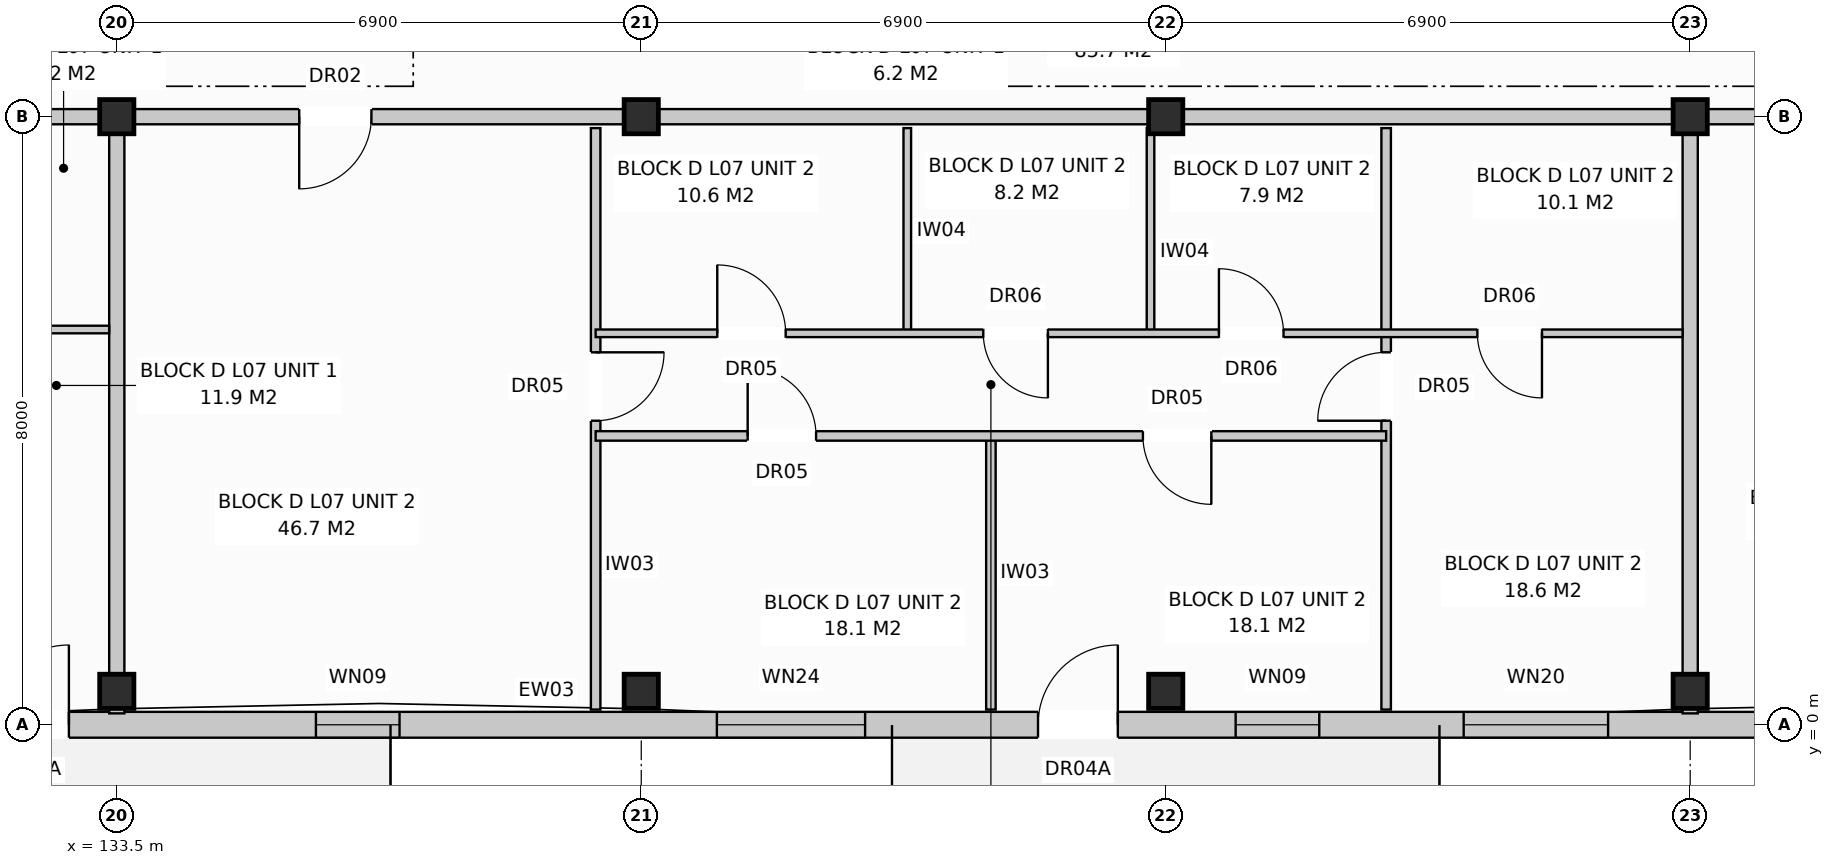
"""IFC4 building model, lengths in metres.
Left out: names, types, materials, properties, quantities, classifications, styles, units other than length and angle.
Written with IfcOpenShell. Run it as: python <this file> out.ifc"""

import sys

from ifc_helpers import new_model, si_unit, direction, frame, frame_2d, origin, origin_with_axes, origin_2d, place, context, subcontext, project, spatial, rectangle, extrude, element, fill, save


model = new_model("IFC4")
c1 = context("Model", 3, precision=1e-05, world=origin(), true_north=direction((0.0, 1.0)))
c2 = subcontext(c1, "Body", "Model", "MODEL_VIEW")
j1 = project(units=[si_unit("LENGTHUNIT", "METRE"), si_unit("PLANEANGLEUNIT", "RADIAN")], contexts=[c1])
p1 = place(None, origin())
s1 = spatial("IfcSite", under=j1, at=p1, CompositionType="ELEMENT")
p2 = place(p1, origin())
s2 = spatial("IfcBuilding", under=s1, at=p2, CompositionType="ELEMENT")
p3 = place(p2, frame((0.0, 0.0, 24.0)))
s3 = spatial("IfcBuildingStorey", under=s2, at=p3, CompositionType="ELEMENT", Elevation=24.0)
for number, where, z_axis, x_axis in (
    (1, (133.5, 0.44, 0.0), (0.0, 0.0, 1.0), (1.0, 0.0, 0.0)),
    (2, (133.5, 8.0, 0.0), (0.0, 0.0, 1.0), (1.0, 0.0, 0.0)),
    (3, (140.4, 0.44, 0.0), (0.0, 0.0, 1.0), (1.0, 0.0, 0.0)),
    (4, (140.4, 8.0, 0.0), (0.0, 0.0, 1.0), (1.0, 0.0, 0.0)),
    (5, (147.3, 0.44, 0.0), (0.0, 0.0, 1.0), (1.0, 0.0, 0.0)),
    (6, (147.3, 8.0, 0.0), (0.0, 0.0, 1.0), (1.0, 0.0, 0.0)),
    (7, (154.2, 0.44, 0.0), (0.0, 0.0, 1.0), (1.0, 0.0, 0.0)),
    (8, (154.2, 8.0, 0.0), (0.0, 0.0, 1.0), (1.0, 0.0, 0.0)),
):
    element("IfcColumn", number, at=place(p3, frame(where, z_axis=z_axis, x_axis=x_axis)), inside=s3, PredefinedType="COLUMN", context=c2, shape_type="SweptSolid", body=[
        extrude(rectangle(XDim=0.45, YDim=0.45, at=origin_2d()), origin(), (0.0, 0.0, 1.0), 3.2),
    ])
p4 = place(p3, frame((126.76, 0.0, 0.0), z_axis=(0.0, 0.0, 1.0), x_axis=(1.0, 0.0, 0.0)))
e9 = element("IfcWall", 9, at=p4, inside=s3, PredefinedType="STANDARD", context=c2, shape_type="SweptSolid", body=[
    extrude(rectangle(XDim=41.08, YDim=0.34, at=frame_2d((20.54, 0.0))), origin(), (0.0, 0.0, 1.0), 2.95),
])
p5 = place(p4, frame((5.06, 0.0, 0.0)))
e10 = element("IfcOpeningElement", 10, at=p5, cuts=e9, PredefinedType="OPENING", context=c2, shape_type="SweptSolid", body=[
    extrude(rectangle(XDim=1.05, YDim=2.12, at=frame_2d((0.525, 1.06))), frame((0.0, 0.182, 0.0), z_axis=(0.0, -1.0, 0.0), x_axis=(1.0, 0.0, 0.0)), (0.0, 0.0, 1.0), 0.364),
])
p6 = place(p4, frame((18.86, 0.0, 0.0)))
e11 = element("IfcOpeningElement", 11, at=p6, cuts=e9, PredefinedType="OPENING", context=c2, shape_type="SweptSolid", body=[
    extrude(rectangle(XDim=1.05, YDim=2.12, at=frame_2d((0.525, 1.06))), frame((0.0, 0.182, 0.0), z_axis=(0.0, -1.0, 0.0), x_axis=(1.0, 0.0, 0.0)), (0.0, 0.0, 1.0), 0.364),
])
p7 = place(p4, frame((31.359, 0.0, 0.0)))
e12 = element("IfcOpeningElement", 12, at=p7, cuts=e9, PredefinedType="OPENING", context=c2, shape_type="SweptSolid", body=[
    extrude(rectangle(XDim=1.05, YDim=2.12, at=frame_2d((0.525, 1.06))), frame((0.0, 0.182, 0.0), z_axis=(0.0, -1.0, 0.0), x_axis=(1.0, 0.0, 0.0)), (0.0, 0.0, 1.0), 0.364),
])
p8 = place(p4, frame((1.11, 0.0, 0.8)))
e13 = element("IfcOpeningElement", 13, at=p8, cuts=e9, PredefinedType="OPENING", context=c2, shape_type="SweptSolid", body=[
    extrude(rectangle(XDim=1.8, YDim=1.7, at=frame_2d((0.9, 0.85))), frame((0.0, 0.182, 0.0), z_axis=(0.0, -1.0, 0.0), x_axis=(1.0, 0.0, 0.0)), (0.0, 0.0, 1.0), 0.364),
])
p9 = place(p4, frame((9.36, 0.0, 0.72)))
e14 = element("IfcOpeningElement", 14, at=p9, cuts=e9, PredefinedType="OPENING", context=c2, shape_type="SweptSolid", body=[
    extrude(rectangle(XDim=1.1, YDim=1.5, at=frame_2d((0.55, 0.75))), frame((0.0, 0.182, 0.0), z_axis=(0.0, -1.0, 0.0), x_axis=(1.0, 0.0, 0.0)), (0.0, 0.0, 1.0), 0.364),
])
p10 = place(p4, frame((14.635, 0.0, 0.8)))
e15 = element("IfcOpeningElement", 15, at=p10, cuts=e9, PredefinedType="OPENING", context=c2, shape_type="SweptSolid", body=[
    extrude(rectangle(XDim=1.95, YDim=1.65, at=frame_2d((0.975, 0.825))), frame((0.0, 0.182, 0.0), z_axis=(0.0, -1.0, 0.0), x_axis=(1.0, 0.0, 0.0)), (0.0, 0.0, 1.0), 0.364),
])
p11 = place(p4, frame((21.46, 0.0, 0.72)))
e16 = element("IfcOpeningElement", 16, at=p11, cuts=e9, PredefinedType="OPENING", context=c2, shape_type="SweptSolid", body=[
    extrude(rectangle(XDim=1.1, YDim=1.5, at=frame_2d((0.55, 0.75))), frame((0.0, 0.182, 0.0), z_axis=(0.0, -1.0, 0.0), x_axis=(1.0, 0.0, 0.0)), (0.0, 0.0, 1.0), 0.364),
])
p12 = place(p4, frame((24.46, 0.0, 0.8)))
e17 = element("IfcOpeningElement", 17, at=p12, cuts=e9, PredefinedType="OPENING", context=c2, shape_type="SweptSolid", body=[
    extrude(rectangle(XDim=1.9, YDim=1.85, at=frame_2d((0.95, 0.925))), frame((0.0, 0.182, 0.0), z_axis=(0.0, -1.0, 0.0), x_axis=(1.0, 0.0, 0.0)), (0.0, 0.0, 1.0), 0.364),
])
p13 = place(p4, frame((29.135, 0.0, 0.8)))
e18 = element("IfcOpeningElement", 18, at=p13, cuts=e9, PredefinedType="OPENING", context=c2, shape_type="SweptSolid", body=[
    extrude(rectangle(XDim=1.95, YDim=1.65, at=frame_2d((0.975, 0.825))), frame((0.0, 0.182, 0.0), z_axis=(0.0, -1.0, 0.0), x_axis=(1.0, 0.0, 0.0)), (0.0, 0.0, 1.0), 0.364),
])
p14 = place(p4, frame((35.26, 0.0, 0.72)))
e19 = element("IfcOpeningElement", 19, at=p14, cuts=e9, PredefinedType="OPENING", context=c2, shape_type="SweptSolid", body=[
    extrude(rectangle(XDim=1.1, YDim=1.5, at=frame_2d((0.55, 0.75))), frame((0.0, 0.182, 0.0), z_axis=(0.0, -1.0, 0.0), x_axis=(1.0, 0.0, 0.0)), (0.0, 0.0, 1.0), 0.364),
])
p15 = place(p4, frame((38.06, 0.0, 0.8)))
e20 = element("IfcOpeningElement", 20, at=p15, cuts=e9, PredefinedType="OPENING", context=c2, shape_type="SweptSolid", body=[
    extrude(rectangle(XDim=1.9, YDim=1.85, at=frame_2d((0.95, 0.925))), frame((0.0, 0.182, 0.0), z_axis=(0.0, -1.0, 0.0), x_axis=(1.0, 0.0, 0.0)), (0.0, 0.0, 1.0), 0.364),
])
p16 = place(p3, frame((133.5, 7.85, 0.0), z_axis=(0.0, 0.0, 1.0), x_axis=(0.0, -1.0, 0.0)))
e21 = element("IfcWall", 21, at=p16, inside=s3, PredefinedType="PARTITIONING", context=c2, shape_type="SweptSolid", body=[
    extrude(rectangle(XDim=7.7, YDim=0.2, at=frame_2d((3.85, 0.0))), origin(), (0.0, 0.0, 1.0), 2.39),
])
p17 = place(p3, frame((126.6, 8.0, 0.0), z_axis=(0.0, 0.0, 1.0), x_axis=(1.0, 0.0, 0.0)))
e22 = element("IfcWall", 22, at=p17, inside=s3, PredefinedType="PARTITIONING", context=c2, shape_type="SweptSolid", body=[
    extrude(rectangle(XDim=6.9, YDim=0.2, at=frame_2d((3.45, 0.0))), origin(), (0.0, 0.0, 1.0), 2.39),
])
p18 = place(p17, frame((2.0, 0.0, 0.0)))
e23 = element("IfcOpeningElement", 23, at=p18, cuts=e22, PredefinedType="OPENING", context=c2, shape_type="SweptSolid", body=[
    extrude(rectangle(XDim=0.95, YDim=2.15, at=frame_2d((0.475, 1.075))), frame((0.0, 0.112, 0.0), z_axis=(0.0, -1.0, 0.0), x_axis=(1.0, 0.0, 0.0)), (0.0, 0.0, 1.0), 0.224),
])
p19 = place(p3, frame((130.9, 5.2, 0.0), z_axis=(0.0, 0.0, 1.0), x_axis=(1.0, 0.0, 0.0)))
e24 = element("IfcWall", 24, at=p19, inside=s3, PredefinedType="PARTITIONING", context=c2, shape_type="SweptSolid", body=[
    extrude(rectangle(XDim=2.5, YDim=0.1, at=frame_2d((1.25, 0.0))), origin(), (0.0, 0.0, 1.0), 2.95),
])
p20 = place(p3, frame((154.2, 7.85, 0.0), z_axis=(0.0, 0.0, 1.0), x_axis=(0.0, -1.0, 0.0)))
e25 = element("IfcWall", 25, at=p20, inside=s3, PredefinedType="PARTITIONING", context=c2, shape_type="SweptSolid", body=[
    extrude(rectangle(XDim=7.7, YDim=0.2, at=frame_2d((3.85, 0.0))), origin(), (0.0, 0.0, 1.0), 2.95),
])
p21 = place(p3, frame((133.5, 8.0, 0.0), z_axis=(0.0, 0.0, 1.0), x_axis=(1.0, 0.0, 0.0)))
e26 = element("IfcWall", 26, at=p21, inside=s3, PredefinedType="PARTITIONING", context=c2, shape_type="SweptSolid", body=[
    extrude(rectangle(XDim=20.7, YDim=0.2, at=frame_2d((10.35, 0.0))), origin(), (0.0, 0.0, 1.0), 2.39),
])
p22 = place(p21, frame((2.4, 0.0, 0.0)))
e27 = element("IfcOpeningElement", 27, at=p22, cuts=e26, PredefinedType="OPENING", context=c2, shape_type="SweptSolid", body=[
    extrude(rectangle(XDim=0.95, YDim=2.15, at=frame_2d((0.475, 1.075))), frame((0.0, 0.112, 0.0), z_axis=(0.0, -1.0, 0.0), x_axis=(1.0, 0.0, 0.0)), (0.0, 0.0, 1.0), 0.224),
])
p23 = place(p3, frame((139.8, 7.85, 0.0), z_axis=(0.0, 0.0, 1.0), x_axis=(0.0, -1.0, 0.0)))
e28 = element("IfcWall", 28, at=p23, inside=s3, PredefinedType="PARTITIONING", context=c2, shape_type="SweptSolid", body=[
    extrude(rectangle(XDim=7.65, YDim=0.125, at=frame_2d((3.825, 0.0))), origin(), (0.0, 0.0, 1.0), 2.95),
])
p24 = place(p23, frame((2.95, 0.0, 0.0)))
e29 = element("IfcOpeningElement", 29, at=p24, cuts=e28, PredefinedType="OPENING", context=c2, shape_type="SweptSolid", body=[
    extrude(rectangle(XDim=0.9, YDim=2.1, at=frame_2d((0.45, 1.05))), frame((0.0, 0.074, 0.0), z_axis=(0.0, -1.0, 0.0), x_axis=(1.0, 0.0, 0.0)), (0.0, 0.0, 1.0), 0.149),
])
for number, where, z_axis, x_axis in (
    (30, (143.9, 7.85, 0.0), (0.0, 0.0, 1.0), (0.0, -1.0, 0.0)),
    (31, (147.1, 7.85, 0.0), (0.0, 0.0, 1.0), (0.0, -1.0, 0.0)),
):
    element("IfcWall", number, at=place(p3, frame(where, z_axis=z_axis, x_axis=x_axis)), inside=s3, PredefinedType="PARTITIONING", context=c2, shape_type="SweptSolid", body=[
        extrude(rectangle(XDim=2.7, YDim=0.1, at=frame_2d((1.35, 0.0))), origin(), (0.0, 0.0, 1.0), 2.95),
    ])
p25 = place(p3, frame((145.0, 3.8, 0.0), z_axis=(0.0, 0.0, 1.0), x_axis=(0.0, -1.0, 0.0)))
e32 = element("IfcWall", 32, at=p25, inside=s3, PredefinedType="PARTITIONING", context=c2, shape_type="SweptSolid", body=[
    extrude(rectangle(XDim=3.6, YDim=0.125, at=frame_2d((1.8, 0.0))), origin(), (0.0, 0.0, 1.0), 2.59),
])
p26 = place(p3, frame((150.2, 7.85, 0.0), z_axis=(0.0, 0.0, 1.0), x_axis=(0.0, -1.0, 0.0)))
e33 = element("IfcWall", 33, at=p26, inside=s3, PredefinedType="PARTITIONING", context=c2, shape_type="SweptSolid", body=[
    extrude(rectangle(XDim=7.65, YDim=0.125, at=frame_2d((3.825, 0.0))), origin(), (0.0, 0.0, 1.0), 2.95),
])
p27 = place(p26, frame((2.95, 0.0, 0.0)))
e34 = element("IfcOpeningElement", 34, at=p27, cuts=e33, PredefinedType="OPENING", context=c2, shape_type="SweptSolid", body=[
    extrude(rectangle(XDim=0.9, YDim=2.1, at=frame_2d((0.45, 1.05))), frame((0.0, 0.074, 0.0), z_axis=(0.0, -1.0, 0.0), x_axis=(1.0, 0.0, 0.0)), (0.0, 0.0, 1.0), 0.149),
])
p28 = place(p3, frame((139.8, 5.15, 0.0), z_axis=(0.0, 0.0, 1.0), x_axis=(1.0, 0.0, 0.0)))
e35 = element("IfcWall", 35, at=p28, inside=s3, PredefinedType="PARTITIONING", context=c2, shape_type="SweptSolid", body=[
    extrude(rectangle(XDim=14.3, YDim=0.1, at=frame_2d((7.15, 0.0))), origin(), (0.0, 0.0, 1.0), 2.95),
])
p29 = place(p28, frame((1.6, 0.0, 0.0)))
e36 = element("IfcOpeningElement", 36, at=p29, cuts=e35, PredefinedType="OPENING", context=c2, shape_type="SweptSolid", body=[
    extrude(rectangle(XDim=0.9, YDim=2.1, at=frame_2d((0.45, 1.05))), frame((0.0, 0.062, 0.0), z_axis=(0.0, -1.0, 0.0), x_axis=(1.0, 0.0, 0.0)), (0.0, 0.0, 1.0), 0.124),
])
p30 = place(p28, frame((5.1, 0.0, 0.0)))
e37 = element("IfcOpeningElement", 37, at=p30, cuts=e35, PredefinedType="OPENING", context=c2, shape_type="SweptSolid", body=[
    extrude(rectangle(XDim=0.85, YDim=2.05, at=frame_2d((0.425, 1.025))), frame((0.0, 0.062, 0.0), z_axis=(0.0, -1.0, 0.0), x_axis=(1.0, 0.0, 0.0)), (0.0, 0.0, 1.0), 0.124),
])
p31 = place(p28, frame((8.2, 0.0, 0.0)))
e38 = element("IfcOpeningElement", 38, at=p31, cuts=e35, PredefinedType="OPENING", context=c2, shape_type="SweptSolid", body=[
    extrude(rectangle(XDim=0.85, YDim=2.05, at=frame_2d((0.425, 1.025))), frame((0.0, 0.062, 0.0), z_axis=(0.0, -1.0, 0.0), x_axis=(1.0, 0.0, 0.0)), (0.0, 0.0, 1.0), 0.124),
])
p32 = place(p28, frame((11.6, 0.0, 0.0)))
e39 = element("IfcOpeningElement", 39, at=p32, cuts=e35, PredefinedType="OPENING", context=c2, shape_type="SweptSolid", body=[
    extrude(rectangle(XDim=0.85, YDim=2.05, at=frame_2d((0.425, 1.025))), frame((0.0, 0.062, 0.0), z_axis=(0.0, -1.0, 0.0), x_axis=(1.0, 0.0, 0.0)), (0.0, 0.0, 1.0), 0.124),
])
p33 = place(p3, frame((139.8, 3.8, 0.0), z_axis=(0.0, 0.0, 1.0), x_axis=(1.0, 0.0, 0.0)))
e40 = element("IfcWall", 40, at=p33, inside=s3, PredefinedType="PARTITIONING", context=c2, shape_type="SweptSolid", body=[
    extrude(rectangle(XDim=10.4, YDim=0.125, at=frame_2d((5.2, 0.0))), origin(), (0.0, 0.0, 1.0), 2.95),
])
p34 = place(p33, frame((2.0, 0.0, 0.0)))
e41 = element("IfcOpeningElement", 41, at=p34, cuts=e40, PredefinedType="OPENING", context=c2, shape_type="SweptSolid", body=[
    extrude(rectangle(XDim=0.9, YDim=2.1, at=frame_2d((0.45, 1.05))), frame((0.0, 0.074, 0.0), z_axis=(0.0, -1.0, 0.0), x_axis=(1.0, 0.0, 0.0)), (0.0, 0.0, 1.0), 0.149),
])
p35 = place(p33, frame((7.2, 0.0, 0.0)))
e42 = element("IfcOpeningElement", 42, at=p35, cuts=e40, PredefinedType="OPENING", context=c2, shape_type="SweptSolid", body=[
    extrude(rectangle(XDim=0.9, YDim=2.1, at=frame_2d((0.45, 1.05))), frame((0.0, 0.074, 0.0), z_axis=(0.0, -1.0, 0.0), x_axis=(1.0, 0.0, 0.0)), (0.0, 0.0, 1.0), 0.149),
])
p36 = place(p3, frame((154.2, 8.0, 0.0), z_axis=(0.0, 0.0, 1.0), x_axis=(1.0, 0.0, 0.0)))
e43 = element("IfcWall", 43, at=p36, inside=s3, PredefinedType="PARTITIONING", context=c2, shape_type="SweptSolid", body=[
    extrude(rectangle(XDim=13.8, YDim=0.2, at=frame_2d((6.9, 0.0))), origin(), (0.0, 0.0, 1.0), 2.39),
])
p37 = place(p36, frame((2.4, 0.0, 0.0)))
e44 = element("IfcOpeningElement", 44, at=p37, cuts=e43, PredefinedType="OPENING", context=c2, shape_type="SweptSolid", body=[
    extrude(rectangle(XDim=0.95, YDim=2.15, at=frame_2d((0.475, 1.075))), frame((0.0, 0.112, 0.0), z_axis=(0.0, -1.0, 0.0), x_axis=(1.0, 0.0, 0.0)), (0.0, 0.0, 1.0), 0.224),
])
p38 = place(p5, origin_with_axes())
e45 = element("IfcDoor", 45, at=p38, inside=s3, OperationType="SINGLE_SWING_RIGHT", PredefinedType="DOOR", context=c2, shape_type="SweptSolid", body=[
    extrude(rectangle(XDim=1.05, YDim=2.12, at=frame_2d((0.525, 1.06))), frame((0.0, 0.025, 0.0), z_axis=(0.0, -1.0, 0.0), x_axis=(1.0, 0.0, 0.0)), (0.0, 0.0, 1.0), 0.05),
])
fill(e10, e45)
p39 = place(p6, origin_with_axes())
e46 = element("IfcDoor", 46, at=p39, inside=s3, OperationType="SINGLE_SWING_RIGHT", PredefinedType="DOOR", context=c2, shape_type="SweptSolid", body=[
    extrude(rectangle(XDim=1.05, YDim=2.12, at=frame_2d((0.525, 1.06))), frame((0.0, 0.025, 0.0), z_axis=(0.0, -1.0, 0.0), x_axis=(1.0, 0.0, 0.0)), (0.0, 0.0, 1.0), 0.05),
])
fill(e11, e46)
p40 = place(p9, origin_with_axes())
e47 = element("IfcWindow", 47, at=p40, inside=s3, PartitioningType="SINGLE_PANEL", PredefinedType="WINDOW", context=c2, shape_type="SweptSolid", body=[
    extrude(rectangle(XDim=1.1, YDim=1.5, at=frame_2d((0.55, 0.75))), frame((0.0, 0.03, 0.0), z_axis=(0.0, -1.0, 0.0), x_axis=(1.0, 0.0, 0.0)), (0.0, 0.0, 1.0), 0.06),
])
fill(e14, e47)
p41 = place(p10, origin_with_axes())
e48 = element("IfcWindow", 48, at=p41, inside=s3, PartitioningType="SINGLE_PANEL", PredefinedType="WINDOW", context=c2, shape_type="SweptSolid", body=[
    extrude(rectangle(XDim=1.95, YDim=1.65, at=frame_2d((0.975, 0.825))), frame((0.0, 0.03, 0.0), z_axis=(0.0, -1.0, 0.0), x_axis=(1.0, 0.0, 0.0)), (0.0, 0.0, 1.0), 0.06),
])
fill(e15, e48)
p42 = place(p11, origin_with_axes())
e49 = element("IfcWindow", 49, at=p42, inside=s3, PartitioningType="SINGLE_PANEL", PredefinedType="WINDOW", context=c2, shape_type="SweptSolid", body=[
    extrude(rectangle(XDim=1.1, YDim=1.5, at=frame_2d((0.55, 0.75))), frame((0.0, 0.03, 0.0), z_axis=(0.0, -1.0, 0.0), x_axis=(1.0, 0.0, 0.0)), (0.0, 0.0, 1.0), 0.06),
])
fill(e16, e49)
p43 = place(p12, origin_with_axes())
e50 = element("IfcWindow", 50, at=p43, inside=s3, PartitioningType="SINGLE_PANEL", PredefinedType="WINDOW", context=c2, shape_type="SweptSolid", body=[
    extrude(rectangle(XDim=1.9, YDim=1.85, at=frame_2d((0.95, 0.925))), frame((0.0, 0.03, 0.0), z_axis=(0.0, -1.0, 0.0), x_axis=(1.0, 0.0, 0.0)), (0.0, 0.0, 1.0), 0.06),
])
fill(e17, e50)
p44 = place(p22, frame((0.95, 0.0, 0.0), z_axis=(0.0, 0.0, 1.0), x_axis=(-1.0, 0.0, 0.0)))
e51 = element("IfcDoor", 51, at=p44, inside=s3, OperationType="SINGLE_SWING_LEFT", PredefinedType="DOOR", context=c2, shape_type="SweptSolid", body=[
    extrude(rectangle(XDim=0.95, YDim=2.15, at=frame_2d((0.475, 1.075))), frame((0.0, 0.025, 0.0), z_axis=(0.0, -1.0, 0.0), x_axis=(1.0, 0.0, 0.0)), (0.0, 0.0, 1.0), 0.05),
])
fill(e27, e51)
p45 = place(p24, origin_with_axes())
e52 = element("IfcDoor", 52, at=p45, inside=s3, OperationType="SINGLE_SWING_LEFT", PredefinedType="DOOR", context=c2, shape_type="SweptSolid", body=[
    extrude(rectangle(XDim=0.9, YDim=2.1, at=frame_2d((0.45, 1.05))), frame((0.0, 0.025, 0.0), z_axis=(0.0, -1.0, 0.0), x_axis=(1.0, 0.0, 0.0)), (0.0, 0.0, 1.0), 0.05),
])
fill(e29, e52)
p46 = place(p27, frame((0.9, 0.0, 0.0), z_axis=(0.0, 0.0, 1.0), x_axis=(-1.0, 0.0, 0.0)))
e53 = element("IfcDoor", 53, at=p46, inside=s3, OperationType="SINGLE_SWING_RIGHT", PredefinedType="DOOR", context=c2, shape_type="SweptSolid", body=[
    extrude(rectangle(XDim=0.9, YDim=2.1, at=frame_2d((0.45, 1.05))), frame((0.0, 0.025, 0.0), z_axis=(0.0, -1.0, 0.0), x_axis=(1.0, 0.0, 0.0)), (0.0, 0.0, 1.0), 0.05),
])
fill(e34, e53)
p47 = place(p29, origin_with_axes())
e54 = element("IfcDoor", 54, at=p47, inside=s3, OperationType="SINGLE_SWING_LEFT", PredefinedType="DOOR", context=c2, shape_type="SweptSolid", body=[
    extrude(rectangle(XDim=0.9, YDim=2.1, at=frame_2d((0.45, 1.05))), frame((0.0, 0.025, 0.0), z_axis=(0.0, -1.0, 0.0), x_axis=(1.0, 0.0, 0.0)), (0.0, 0.0, 1.0), 0.05),
])
fill(e36, e54)
p48 = place(p30, frame((0.85, 0.0, 0.0), z_axis=(0.0, 0.0, 1.0), x_axis=(-1.0, 0.0, 0.0)))
e55 = element("IfcDoor", 55, at=p48, inside=s3, OperationType="SINGLE_SWING_RIGHT", PredefinedType="DOOR", context=c2, shape_type="SweptSolid", body=[
    extrude(rectangle(XDim=0.85, YDim=2.05, at=frame_2d((0.425, 1.025))), frame((0.0, 0.025, 0.0), z_axis=(0.0, -1.0, 0.0), x_axis=(1.0, 0.0, 0.0)), (0.0, 0.0, 1.0), 0.05),
])
fill(e37, e55)
p49 = place(p31, origin_with_axes())
e56 = element("IfcDoor", 56, at=p49, inside=s3, OperationType="SINGLE_SWING_LEFT", PredefinedType="DOOR", context=c2, shape_type="SweptSolid", body=[
    extrude(rectangle(XDim=0.85, YDim=2.05, at=frame_2d((0.425, 1.025))), frame((0.0, 0.025, 0.0), z_axis=(0.0, -1.0, 0.0), x_axis=(1.0, 0.0, 0.0)), (0.0, 0.0, 1.0), 0.05),
])
fill(e38, e56)
p50 = place(p32, frame((0.85, 0.0, 0.0), z_axis=(0.0, 0.0, 1.0), x_axis=(-1.0, 0.0, 0.0)))
e57 = element("IfcDoor", 57, at=p50, inside=s3, OperationType="SINGLE_SWING_RIGHT", PredefinedType="DOOR", context=c2, shape_type="SweptSolid", body=[
    extrude(rectangle(XDim=0.85, YDim=2.05, at=frame_2d((0.425, 1.025))), frame((0.0, 0.025, 0.0), z_axis=(0.0, -1.0, 0.0), x_axis=(1.0, 0.0, 0.0)), (0.0, 0.0, 1.0), 0.05),
])
fill(e39, e57)
p51 = place(p34, origin_with_axes())
e58 = element("IfcDoor", 58, at=p51, inside=s3, OperationType="SINGLE_SWING_LEFT", PredefinedType="DOOR", context=c2, shape_type="SweptSolid", body=[
    extrude(rectangle(XDim=0.9, YDim=2.1, at=frame_2d((0.45, 1.05))), frame((0.0, 0.025, 0.0), z_axis=(0.0, -1.0, 0.0), x_axis=(1.0, 0.0, 0.0)), (0.0, 0.0, 1.0), 0.05),
])
fill(e41, e58)
p52 = place(p35, frame((0.9, 0.0, 0.0), z_axis=(0.0, 0.0, 1.0), x_axis=(-1.0, 0.0, 0.0)))
e59 = element("IfcDoor", 59, at=p52, inside=s3, OperationType="SINGLE_SWING_RIGHT", PredefinedType="DOOR", context=c2, shape_type="SweptSolid", body=[
    extrude(rectangle(XDim=0.9, YDim=2.1, at=frame_2d((0.45, 1.05))), frame((0.0, 0.025, 0.0), z_axis=(0.0, -1.0, 0.0), x_axis=(1.0, 0.0, 0.0)), (0.0, 0.0, 1.0), 0.05),
])
fill(e42, e59)
save(model, sys.argv[1])
